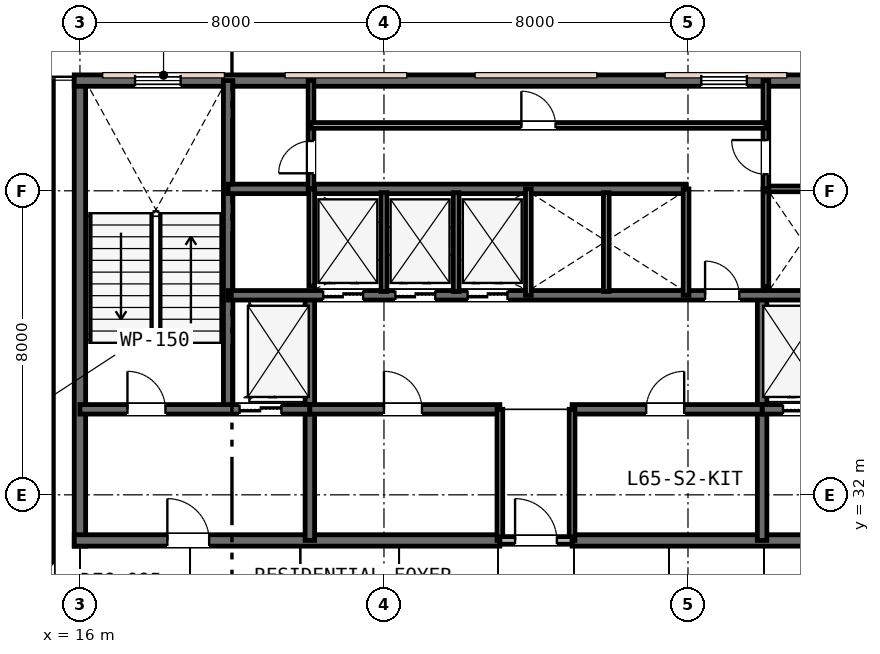
"""IFC4 building model, lengths in metres.
Left out: names, types, materials, properties, quantities, classifications, styles, units other than length and angle.
Written with IfcOpenShell. Run it as: python <this file> out.ifc"""

import sys

from ifc_helpers import new_model, si_unit, direction, frame, frame_2d, origin, place, context, subcontext, project, spatial, rectangle, extrude, element, fill, save


model = new_model("IFC4")
c1 = context("Model", 3, precision=1e-05, world=origin(), true_north=direction((0.0, 1.0)))
c2 = subcontext(c1, "Body", "Model", "MODEL_VIEW")
j1 = project(units=[si_unit("LENGTHUNIT", "METRE"), si_unit("PLANEANGLEUNIT", "RADIAN")], contexts=[c1])
p1 = place(None, origin())
s1 = spatial("IfcSite", under=j1, at=p1, CompositionType="ELEMENT")
p2 = place(p1, origin())
s2 = spatial("IfcBuilding", under=s1, at=p2, CompositionType="ELEMENT")
p3 = place(p2, frame((0.0, 0.0, 252.6)))
s3 = spatial("IfcBuildingStorey", under=s2, at=p3, CompositionType="ELEMENT", Elevation=252.6)
p4 = place(p3, frame((16.0, 30.65, 0.0), z_axis=(0.0, 0.0, 1.0), x_axis=(0.0, 1.0, 0.0)))
e1 = element("IfcWall", 1, at=p4, inside=s3, PredefinedType="SHEAR", context=c2, shape_type="SweptSolid", body=[
    extrude(rectangle(XDim=12.3, YDim=0.3, at=frame_2d((6.15, 0.0))), origin(), (0.0, 0.0, 1.0), 3.8),
])
p5 = place(p3, frame((15.85, 42.9, 0.0), z_axis=(0.0, 0.0, 1.0), x_axis=(1.0, 0.0, 0.0)))
e2 = element("IfcWall", 2, at=p5, inside=s3, PredefinedType="SHEAR", context=c2, shape_type="SweptSolid", body=[
    extrude(rectangle(XDim=24.3, YDim=0.3, at=frame_2d((12.15, 0.0))), origin(), (0.0, 0.0, 1.0), 3.8),
])
p6 = place(p5, frame((1.6, 0.0, 0.95)))
e3 = element("IfcOpeningElement", 3, at=p6, cuts=e2, PredefinedType="OPENING", context=c2, shape_type="SweptSolid", body=[
    extrude(rectangle(XDim=1.2, YDim=1.6, at=frame_2d((0.6, 0.8))), frame((0.0, 0.16, 0.0), z_axis=(0.0, -1.0, 0.0), x_axis=(1.0, 0.0, 0.0)), (0.0, 0.0, 1.0), 0.32),
])
p7 = place(p5, frame((16.5, 0.0, 0.95)))
e4 = element("IfcOpeningElement", 4, at=p7, cuts=e2, PredefinedType="OPENING", context=c2, shape_type="SweptSolid", body=[
    extrude(rectangle(XDim=1.2, YDim=1.6, at=frame_2d((0.6, 0.8))), frame((0.0, 0.16, 0.0), z_axis=(0.0, -1.0, 0.0), x_axis=(1.0, 0.0, 0.0)), (0.0, 0.0, 1.0), 0.32),
])
p8 = place(p5, frame((21.6, 0.0, 0.95)))
e5 = element("IfcOpeningElement", 5, at=p8, cuts=e2, PredefinedType="OPENING", context=c2, shape_type="SweptSolid", body=[
    extrude(rectangle(XDim=1.2, YDim=1.6, at=frame_2d((0.6, 0.8))), frame((0.0, 0.16, 0.0), z_axis=(0.0, -1.0, 0.0), x_axis=(1.0, 0.0, 0.0)), (0.0, 0.0, 1.0), 0.32),
])
p9 = place(p3, frame((15.85, 30.8, 0.0), z_axis=(0.0, 0.0, 1.0), x_axis=(1.0, 0.0, 0.0)))
e6 = element("IfcWall", 6, at=p9, inside=s3, PredefinedType="SHEAR", context=c2, shape_type="SweptSolid", body=[
    extrude(rectangle(XDim=11.2, YDim=0.3, at=frame_2d((5.6, 0.0))), origin(), (0.0, 0.0, 1.0), 3.8),
])
p10 = place(p9, frame((2.45, 0.0, 0.0)))
e7 = element("IfcOpeningElement", 7, at=p10, cuts=e6, PredefinedType="OPENING", context=c2, shape_type="SweptSolid", body=[
    extrude(rectangle(XDim=1.1, YDim=2.15, at=frame_2d((0.55, 1.075))), frame((0.0, 0.16, 0.0), z_axis=(0.0, -1.0, 0.0), x_axis=(1.0, 0.0, 0.0)), (0.0, 0.0, 1.0), 0.32),
])
p11 = place(p3, frame((28.95, 30.8, 0.0), z_axis=(0.0, 0.0, 1.0), x_axis=(1.0, 0.0, 0.0)))
e8 = element("IfcWall", 8, at=p11, inside=s3, PredefinedType="SHEAR", context=c2, shape_type="SweptSolid", body=[
    extrude(rectangle(XDim=11.2, YDim=0.3, at=frame_2d((5.6, 0.0))), origin(), (0.0, 0.0, 1.0), 3.8),
])
p12 = place(p11, frame((7.65, 0.0, 0.0)))
e9 = element("IfcOpeningElement", 9, at=p12, cuts=e8, PredefinedType="OPENING", context=c2, shape_type="SweptSolid", body=[
    extrude(rectangle(XDim=1.1, YDim=2.15, at=frame_2d((0.55, 1.075))), frame((0.0, 0.16, 0.0), z_axis=(0.0, -1.0, 0.0), x_axis=(1.0, 0.0, 0.0)), (0.0, 0.0, 1.0), 0.32),
])
p13 = place(p3, frame((19.9, 34.25, 0.0), z_axis=(0.0, 0.0, 1.0), x_axis=(0.0, 1.0, 0.0)))
e10 = element("IfcWall", 10, at=p13, inside=s3, PredefinedType="SHEAR", context=c2, shape_type="SweptSolid", body=[
    extrude(rectangle(XDim=8.65, YDim=0.25, at=frame_2d((4.325, 0.0))), origin(), (0.0, 0.0, 1.0), 3.8),
])
for number, where, z_axis, x_axis in (
    (11, (22.05, 30.8, 0.0), (0.0, 0.0, 1.0), (0.0, 1.0, 0.0)),
    (12, (33.95, 30.8, 0.0), (0.0, 0.0, 1.0), (0.0, 1.0, 0.0)),
):
    element("IfcWall", number, at=place(p3, frame(where, z_axis=z_axis, x_axis=x_axis)), inside=s3, PredefinedType="SHEAR", context=c2, shape_type="SweptSolid", body=[
        extrude(rectangle(XDim=6.45, YDim=0.25, at=frame_2d((3.225, 0.0))), origin(), (0.0, 0.0, 1.0), 3.8),
    ])
p14 = place(p3, frame((16.0, 34.25, 0.0), z_axis=(0.0, 0.0, 1.0), x_axis=(1.0, 0.0, 0.0)))
e13 = element("IfcWall", 13, at=p14, inside=s3, PredefinedType="SHEAR", context=c2, shape_type="SweptSolid", body=[
    extrude(rectangle(XDim=6.05, YDim=0.25, at=frame_2d((3.025, 0.0))), origin(), (0.0, 0.0, 1.0), 3.8),
])
p15 = place(p14, frame((1.25, 0.0, 0.0)))
e14 = element("IfcOpeningElement", 14, at=p15, cuts=e13, PredefinedType="OPENING", context=c2, shape_type="SweptSolid", body=[
    extrude(rectangle(XDim=1.0, YDim=2.15, at=frame_2d((0.5, 1.075))), frame((0.0, 0.135, 0.0), z_axis=(0.0, -1.0, 0.0), x_axis=(1.0, 0.0, 0.0)), (0.0, 0.0, 1.0), 0.27),
])
p16 = place(p14, frame((4.2, 0.0, 0.0)))
e15 = element("IfcOpeningElement", 15, at=p16, cuts=e13, PredefinedType="OPENING", context=c2, shape_type="SweptSolid", body=[
    extrude(rectangle(XDim=1.1, YDim=2.15, at=frame_2d((0.55, 1.075))), frame((0.0, 0.135, 0.0), z_axis=(0.0, -1.0, 0.0), x_axis=(1.0, 0.0, 0.0)), (0.0, 0.0, 1.0), 0.27),
])
p17 = place(p3, frame((33.95, 34.25, 0.0), z_axis=(0.0, 0.0, 1.0), x_axis=(1.0, 0.0, 0.0)))
e16 = element("IfcWall", 16, at=p17, inside=s3, PredefinedType="SHEAR", context=c2, shape_type="SweptSolid", body=[
    extrude(rectangle(XDim=6.05, YDim=0.25, at=frame_2d((3.025, 0.0))), origin(), (0.0, 0.0, 1.0), 3.8),
])
p18 = place(p17, frame((3.7, 0.0, 0.0)))
e17 = element("IfcOpeningElement", 17, at=p18, cuts=e16, PredefinedType="OPENING", context=c2, shape_type="SweptSolid", body=[
    extrude(rectangle(XDim=1.0, YDim=2.15, at=frame_2d((0.5, 1.075))), frame((0.0, 0.135, 0.0), z_axis=(0.0, -1.0, 0.0), x_axis=(1.0, 0.0, 0.0)), (0.0, 0.0, 1.0), 0.27),
])
p19 = place(p17, frame((0.55, 0.0, 0.0)))
e18 = element("IfcOpeningElement", 18, at=p19, cuts=e16, PredefinedType="OPENING", context=c2, shape_type="SweptSolid", body=[
    extrude(rectangle(XDim=1.1, YDim=2.15, at=frame_2d((0.55, 1.075))), frame((0.0, 0.135, 0.0), z_axis=(0.0, -1.0, 0.0), x_axis=(1.0, 0.0, 0.0)), (0.0, 0.0, 1.0), 0.27),
])
p20 = place(p3, frame((22.05, 34.25, 0.0), z_axis=(0.0, 0.0, 1.0), x_axis=(1.0, 0.0, 0.0)))
e19 = element("IfcWall", 19, at=p20, inside=s3, PredefinedType="SHEAR", context=c2, shape_type="SweptSolid", body=[
    extrude(rectangle(XDim=5.0, YDim=0.25, at=frame_2d((2.5, 0.0))), origin(), (0.0, 0.0, 1.0), 3.8),
])
p21 = place(p20, frame((1.95, 0.0, 0.0)))
e20 = element("IfcOpeningElement", 20, at=p21, cuts=e19, PredefinedType="OPENING", context=c2, shape_type="SweptSolid", body=[
    extrude(rectangle(XDim=1.0, YDim=2.15, at=frame_2d((0.5, 1.075))), frame((0.0, 0.135, 0.0), z_axis=(0.0, -1.0, 0.0), x_axis=(1.0, 0.0, 0.0)), (0.0, 0.0, 1.0), 0.27),
])
p22 = place(p3, frame((28.95, 34.25, 0.0), z_axis=(0.0, 0.0, 1.0), x_axis=(1.0, 0.0, 0.0)))
e21 = element("IfcWall", 21, at=p22, inside=s3, PredefinedType="SHEAR", context=c2, shape_type="SweptSolid", body=[
    extrude(rectangle(XDim=5.0, YDim=0.25, at=frame_2d((2.5, 0.0))), origin(), (0.0, 0.0, 1.0), 3.8),
])
p23 = place(p22, frame((1.95, 0.0, 0.0)))
e22 = element("IfcOpeningElement", 22, at=p23, cuts=e21, PredefinedType="OPENING", context=c2, shape_type="SweptSolid", body=[
    extrude(rectangle(XDim=1.0, YDim=2.15, at=frame_2d((0.5, 1.075))), frame((0.0, 0.135, 0.0), z_axis=(0.0, -1.0, 0.0), x_axis=(1.0, 0.0, 0.0)), (0.0, 0.0, 1.0), 0.27),
])
p24 = place(p3, frame((19.9, 37.25, 0.0), z_axis=(0.0, 0.0, 1.0), x_axis=(1.0, 0.0, 0.0)))
e23 = element("IfcWall", 23, at=p24, inside=s3, PredefinedType="SHEAR", context=c2, shape_type="SweptSolid", body=[
    extrude(rectangle(XDim=16.2, YDim=0.25, at=frame_2d((8.1, 0.0))), origin(), (0.0, 0.0, 1.0), 3.8),
])
p25 = place(p24, frame((12.55, 0.0, 0.0)))
e24 = element("IfcOpeningElement", 24, at=p25, cuts=e23, PredefinedType="OPENING", context=c2, shape_type="SweptSolid", body=[
    extrude(rectangle(XDim=0.9, YDim=2.15, at=frame_2d((0.45, 1.075))), frame((0.0, 0.135, 0.0), z_axis=(0.0, -1.0, 0.0), x_axis=(1.0, 0.0, 0.0)), (0.0, 0.0, 1.0), 0.27),
])
p26 = place(p24, frame((2.5, 0.0, 0.0)))
e25 = element("IfcOpeningElement", 25, at=p26, cuts=e23, PredefinedType="OPENING", context=c2, shape_type="SweptSolid", body=[
    extrude(rectangle(XDim=1.05, YDim=2.15, at=frame_2d((0.525, 1.075))), frame((0.0, 0.135, 0.0), z_axis=(0.0, -1.0, 0.0), x_axis=(1.0, 0.0, 0.0)), (0.0, 0.0, 1.0), 0.27),
])
p27 = place(p24, frame((4.4, 0.0, 0.0)))
e26 = element("IfcOpeningElement", 26, at=p27, cuts=e23, PredefinedType="OPENING", context=c2, shape_type="SweptSolid", body=[
    extrude(rectangle(XDim=1.05, YDim=2.15, at=frame_2d((0.525, 1.075))), frame((0.0, 0.135, 0.0), z_axis=(0.0, -1.0, 0.0), x_axis=(1.0, 0.0, 0.0)), (0.0, 0.0, 1.0), 0.27),
])
p28 = place(p24, frame((6.3, 0.0, 0.0)))
e27 = element("IfcOpeningElement", 27, at=p28, cuts=e23, PredefinedType="OPENING", context=c2, shape_type="SweptSolid", body=[
    extrude(rectangle(XDim=1.05, YDim=2.15, at=frame_2d((0.525, 1.075))), frame((0.0, 0.135, 0.0), z_axis=(0.0, -1.0, 0.0), x_axis=(1.0, 0.0, 0.0)), (0.0, 0.0, 1.0), 0.27),
])
p29 = place(p3, frame((19.9, 40.05, 0.0), z_axis=(0.0, 0.0, 1.0), x_axis=(1.0, 0.0, 0.0)))
e28 = element("IfcWall", 28, at=p29, inside=s3, PredefinedType="SHEAR", context=c2, shape_type="SweptSolid", body=[
    extrude(rectangle(XDim=12.05, YDim=0.25, at=frame_2d((6.025, 0.0))), origin(), (0.0, 0.0, 1.0), 3.8),
])
for number, where, z_axis, x_axis in (
    (29, (27.05, 30.8, 0.0), (0.0, 0.0, 1.0), (0.0, 1.0, 0.0)),
    (30, (28.95, 30.8, 0.0), (0.0, 0.0, 1.0), (0.0, 1.0, 0.0)),
):
    element("IfcWall", number, at=place(p3, frame(where, z_axis=z_axis, x_axis=x_axis)), inside=s3, PredefinedType="PLUMBINGWALL", context=c2, shape_type="SweptSolid", body=[
        extrude(rectangle(XDim=3.45, YDim=0.15, at=frame_2d((1.725, 0.0))), origin(), (0.0, 0.0, 1.0), 3.28),
    ])
p30 = place(p3, frame((27.05, 30.8, 0.0), z_axis=(0.0, 0.0, 1.0), x_axis=(1.0, 0.0, 0.0)))
e31 = element("IfcWall", 31, at=p30, inside=s3, PredefinedType="PARTITIONING", context=c2, shape_type="SweptSolid", body=[
    extrude(rectangle(XDim=1.9, YDim=0.2, at=frame_2d((0.95, 0.0))), origin(), (0.0, 0.0, 1.0), 3.28),
])
p31 = place(p30, frame((0.4, 0.0, 0.0)))
e32 = element("IfcOpeningElement", 32, at=p31, cuts=e31, PredefinedType="OPENING", context=c2, shape_type="SweptSolid", body=[
    extrude(rectangle(XDim=1.1, YDim=2.15, at=frame_2d((0.55, 1.075))), frame((0.0, 0.11, 0.0), z_axis=(0.0, -1.0, 0.0), x_axis=(1.0, 0.0, 0.0)), (0.0, 0.0, 1.0), 0.22),
])
p32 = place(p3, frame((22.1, 37.49, 0.0), z_axis=(0.0, 0.0, 1.0), x_axis=(0.0, 1.0, 0.0)))
e33 = element("IfcWall", 33, at=p32, inside=s3, PredefinedType="PLUMBINGWALL", context=c2, shape_type="SweptSolid", body=[
    extrude(rectangle(XDim=2.56, YDim=0.15, at=frame_2d((1.28, 0.0))), origin(), (0.0, 0.0, 1.0), 3.53),
])
p33 = place(p3, frame((27.8, 37.25, 0.0), z_axis=(0.0, 0.0, 1.0), x_axis=(0.0, 1.0, 0.0)))
e34 = element("IfcWall", 34, at=p33, inside=s3, PredefinedType="PLUMBINGWALL", context=c2, shape_type="SweptSolid", body=[
    extrude(rectangle(XDim=2.8, YDim=0.15, at=frame_2d((1.4, 0.0))), origin(), (0.0, 0.0, 1.0), 3.53),
])
for number, where, z_axis, x_axis in (
    (35, (24.0, 37.35, 0.0), (0.0, 0.0, 1.0), (0.0, 1.0, 0.0)),
    (36, (25.9, 37.35, 0.0), (0.0, 0.0, 1.0), (0.0, 1.0, 0.0)),
):
    element("IfcWall", number, at=place(p3, frame(where, z_axis=z_axis, x_axis=x_axis)), inside=s3, PredefinedType="PLUMBINGWALL", context=c2, shape_type="SweptSolid", body=[
        extrude(rectangle(XDim=2.6, YDim=0.15, at=frame_2d((1.3, 0.0))), origin(), (0.0, 0.0, 1.0), 3.53),
    ])
p34 = place(p3, frame((31.95, 37.25, 0.0), z_axis=(0.0, 0.0, 1.0), x_axis=(0.0, 1.0, 0.0)))
e37 = element("IfcWall", 37, at=p34, inside=s3, PredefinedType="PLUMBINGWALL", context=c2, shape_type="SweptSolid", body=[
    extrude(rectangle(XDim=2.8, YDim=0.15, at=frame_2d((1.4, 0.0))), origin(), (0.0, 0.0, 1.0), 3.53),
])
p35 = place(p3, frame((29.85, 37.35, 0.0), z_axis=(0.0, 0.0, 1.0), x_axis=(0.0, 1.0, 0.0)))
e38 = element("IfcWall", 38, at=p35, inside=s3, PredefinedType="PLUMBINGWALL", context=c2, shape_type="SweptSolid", body=[
    extrude(rectangle(XDim=2.6, YDim=0.15, at=frame_2d((1.3, 0.0))), origin(), (0.0, 0.0, 1.0), 3.53),
])
p36 = place(p3, frame((34.05, 37.473, 0.0), z_axis=(0.0, 0.0, 1.0), x_axis=(0.0, 1.0, 0.0)))
e39 = element("IfcWall", 39, at=p36, inside=s3, PredefinedType="PLUMBINGWALL", context=c2, shape_type="SweptSolid", body=[
    extrude(rectangle(XDim=2.577, YDim=0.15, at=frame_2d((1.288, 0.0))), origin(), (0.0, 0.0, 1.0), 3.53),
])
p37 = place(p3, frame((34.05, 40.05, 0.0), z_axis=(0.0, 0.0, 1.0), x_axis=(1.0, 0.0, 0.0)))
e40 = element("IfcWall", 40, at=p37, inside=s3, PredefinedType="PARTITIONING", context=c2, shape_type="SweptSolid", body=[
    extrude(rectangle(XDim=2.05, YDim=0.15, at=frame_2d((1.025, 0.0))), origin(), (0.0, 0.0, 1.0), 3.53),
])
p38 = place(p3, frame((34.05, 40.05, 0.0), z_axis=(0.0, 0.0, 1.0), x_axis=(0.0, 1.0, 0.0)))
e41 = element("IfcWall", 41, at=p38, inside=s3, PredefinedType="PARTITIONING", context=c2, shape_type="SweptSolid", body=[
    extrude(rectangle(XDim=2.85, YDim=0.15, at=frame_2d((1.425, 0.0))), origin(), (0.0, 0.0, 1.0), 3.53),
])
p39 = place(p38, frame((0.385, 0.0, 0.0)))
e42 = element("IfcOpeningElement", 42, at=p39, cuts=e41, PredefinedType="OPENING", context=c2, shape_type="SweptSolid", body=[
    extrude(rectangle(XDim=0.9, YDim=2.15, at=frame_2d((0.45, 1.075))), frame((0.0, 0.085, 0.0), z_axis=(0.0, -1.0, 0.0), x_axis=(1.0, 0.0, 0.0)), (0.0, 0.0, 1.0), 0.17),
])
p40 = place(p3, frame((22.08, 40.05, 0.0), z_axis=(0.0, 0.0, 1.0), x_axis=(0.0, 1.0, 0.0)))
e43 = element("IfcWall", 43, at=p40, inside=s3, PredefinedType="PARTITIONING", context=c2, shape_type="SweptSolid", body=[
    extrude(rectangle(XDim=2.85, YDim=0.15, at=frame_2d((1.425, 0.0))), origin(), (0.0, 0.0, 1.0), 3.53),
])
p41 = place(p40, frame((0.41, 0.0, 0.0)))
e44 = element("IfcOpeningElement", 44, at=p41, cuts=e43, PredefinedType="OPENING", context=c2, shape_type="SweptSolid", body=[
    extrude(rectangle(XDim=0.85, YDim=2.15, at=frame_2d((0.425, 1.075))), frame((0.0, 0.085, 0.0), z_axis=(0.0, -1.0, 0.0), x_axis=(1.0, 0.0, 0.0)), (0.0, 0.0, 1.0), 0.17),
])
p42 = place(p3, frame((22.08, 41.72, 0.0), z_axis=(0.0, 0.0, 1.0), x_axis=(1.0, 0.0, 0.0)))
e45 = element("IfcWall", 45, at=p42, inside=s3, PredefinedType="PARTITIONING", context=c2, shape_type="SweptSolid", body=[
    extrude(rectangle(XDim=11.97, YDim=0.15, at=frame_2d((5.985, 0.0))), origin(), (0.0, 0.0, 1.0), 3.53),
])
p43 = place(p42, frame((5.535, 0.0, 0.0)))
e46 = element("IfcOpeningElement", 46, at=p43, cuts=e45, PredefinedType="OPENING", context=c2, shape_type="SweptSolid", body=[
    extrude(rectangle(XDim=0.9, YDim=2.15, at=frame_2d((0.45, 1.075))), frame((0.0, 0.085, 0.0), z_axis=(0.0, -1.0, 0.0), x_axis=(1.0, 0.0, 0.0)), (0.0, 0.0, 1.0), 0.17),
])
p44 = place(p3, frame((15.2, 28.6, 0.0), z_axis=(0.0, 0.0, 1.0), x_axis=(0.0, 1.0, 0.0)))
e47 = element("IfcWall", 47, at=p44, inside=s3, PredefinedType="PARTITIONING", context=c2, shape_type="SweptSolid", body=[
    extrude(rectangle(XDim=14.3, YDim=0.2, at=frame_2d((7.15, 0.0))), origin(), (0.0, 0.0, 1.0), 3.16),
])
p45 = place(p44, frame((0.625, 0.0, 0.0)))
e48 = element("IfcOpeningElement", 48, at=p45, cuts=e47, PredefinedType="OPENING", context=c2, shape_type="SweptSolid", body=[
    extrude(rectangle(XDim=0.95, YDim=2.15, at=frame_2d((0.475, 1.075))), frame((0.0, 0.11, 0.0), z_axis=(0.0, -1.0, 0.0), x_axis=(1.0, 0.0, 0.0)), (0.0, 0.0, 1.0), 0.22),
])
p46 = place(p6, origin())
e49 = element("IfcWindow", 49, at=p46, inside=s3, PartitioningType="SINGLE_PANEL", PredefinedType="WINDOW", context=c2, shape_type="SweptSolid", body=[
    extrude(rectangle(XDim=1.2, YDim=1.6, at=frame_2d((0.6, 0.8))), frame((0.0, 0.03, 0.0), z_axis=(0.0, -1.0, 0.0), x_axis=(1.0, 0.0, 0.0)), (0.0, 0.0, 1.0), 0.06),
])
fill(e3, e49)
p47 = place(p7, origin())
e50 = element("IfcWindow", 50, at=p47, inside=s3, PartitioningType="SINGLE_PANEL", PredefinedType="WINDOW", context=c2, shape_type="SweptSolid", body=[
    extrude(rectangle(XDim=1.2, YDim=1.6, at=frame_2d((0.6, 0.8))), frame((0.0, 0.03, 0.0), z_axis=(0.0, -1.0, 0.0), x_axis=(1.0, 0.0, 0.0)), (0.0, 0.0, 1.0), 0.06),
])
fill(e4, e50)
p48 = place(p31, origin())
e51 = element("IfcDoor", 51, at=p48, inside=s3, OperationType="SINGLE_SWING_LEFT", PredefinedType="DOOR", context=c2, shape_type="SweptSolid", body=[
    extrude(rectangle(XDim=1.1, YDim=2.15, at=frame_2d((0.55, 1.075))), frame((0.0, 0.025, 0.0), z_axis=(0.0, -1.0, 0.0), x_axis=(1.0, 0.0, 0.0)), (0.0, 0.0, 1.0), 0.05),
])
fill(e32, e51)
p49 = place(p15, origin())
e52 = element("IfcDoor", 52, at=p49, inside=s3, OperationType="SINGLE_SWING_LEFT", PredefinedType="DOOR", context=c2, shape_type="SweptSolid", body=[
    extrude(rectangle(XDim=1.0, YDim=2.15, at=frame_2d((0.5, 1.075))), frame((0.0, 0.025, 0.0), z_axis=(0.0, -1.0, 0.0), x_axis=(1.0, 0.0, 0.0)), (0.0, 0.0, 1.0), 0.05),
])
fill(e14, e52)
p50 = place(p10, origin())
e53 = element("IfcDoor", 53, at=p50, inside=s3, OperationType="SINGLE_SWING_LEFT", PredefinedType="DOOR", context=c2, shape_type="SweptSolid", body=[
    extrude(rectangle(XDim=1.1, YDim=2.15, at=frame_2d((0.55, 1.075))), frame((0.0, 0.025, 0.0), z_axis=(0.0, -1.0, 0.0), x_axis=(1.0, 0.0, 0.0)), (0.0, 0.0, 1.0), 0.05),
])
fill(e7, e53)
p51 = place(p21, origin())
e54 = element("IfcDoor", 54, at=p51, inside=s3, OperationType="SINGLE_SWING_LEFT", PredefinedType="DOOR", context=c2, shape_type="SweptSolid", body=[
    extrude(rectangle(XDim=1.0, YDim=2.15, at=frame_2d((0.5, 1.075))), frame((0.0, 0.025, 0.0), z_axis=(0.0, -1.0, 0.0), x_axis=(1.0, 0.0, 0.0)), (0.0, 0.0, 1.0), 0.05),
])
fill(e20, e54)
p52 = place(p23, origin())
e55 = element("IfcDoor", 55, at=p52, inside=s3, OperationType="SINGLE_SWING_RIGHT", PredefinedType="DOOR", context=c2, shape_type="SweptSolid", body=[
    extrude(rectangle(XDim=1.0, YDim=2.15, at=frame_2d((0.5, 1.075))), frame((0.0, 0.025, 0.0), z_axis=(0.0, -1.0, 0.0), x_axis=(1.0, 0.0, 0.0)), (0.0, 0.0, 1.0), 0.05),
])
fill(e22, e55)
p53 = place(p25, origin())
e56 = element("IfcDoor", 56, at=p53, inside=s3, OperationType="SINGLE_SWING_LEFT", PredefinedType="DOOR", context=c2, shape_type="SweptSolid", body=[
    extrude(rectangle(XDim=0.9, YDim=2.15, at=frame_2d((0.45, 1.075))), frame((0.0, 0.025, 0.0), z_axis=(0.0, -1.0, 0.0), x_axis=(1.0, 0.0, 0.0)), (0.0, 0.0, 1.0), 0.05),
])
fill(e24, e56)
p54 = place(p39, origin())
e57 = element("IfcDoor", 57, at=p54, inside=s3, OperationType="SINGLE_SWING_RIGHT", PredefinedType="DOOR", context=c2, shape_type="SweptSolid", body=[
    extrude(rectangle(XDim=0.9, YDim=2.15, at=frame_2d((0.45, 1.075))), frame((0.0, 0.025, 0.0), z_axis=(0.0, -1.0, 0.0), x_axis=(1.0, 0.0, 0.0)), (0.0, 0.0, 1.0), 0.05),
])
fill(e42, e57)
p55 = place(p41, origin())
e58 = element("IfcDoor", 58, at=p55, inside=s3, OperationType="SINGLE_SWING_LEFT", PredefinedType="DOOR", context=c2, shape_type="SweptSolid", body=[
    extrude(rectangle(XDim=0.85, YDim=2.15, at=frame_2d((0.425, 1.075))), frame((0.0, 0.025, 0.0), z_axis=(0.0, -1.0, 0.0), x_axis=(1.0, 0.0, 0.0)), (0.0, 0.0, 1.0), 0.05),
])
fill(e44, e58)
p56 = place(p43, origin())
e59 = element("IfcDoor", 59, at=p56, inside=s3, OperationType="SINGLE_SWING_LEFT", PredefinedType="DOOR", context=c2, shape_type="SweptSolid", body=[
    extrude(rectangle(XDim=0.9, YDim=2.15, at=frame_2d((0.45, 1.075))), frame((0.0, 0.025, 0.0), z_axis=(0.0, -1.0, 0.0), x_axis=(1.0, 0.0, 0.0)), (0.0, 0.0, 1.0), 0.05),
])
fill(e46, e59)
p57 = place(p16, origin())
e60 = element("IfcDoor", 60, at=p57, inside=s3, OperationType="DOUBLE_DOOR_SLIDING", PredefinedType="DOOR", context=c2, shape_type="SweptSolid", body=[
    extrude(rectangle(XDim=1.1, YDim=2.15, at=frame_2d((0.55, 1.075))), frame((0.0, 0.025, 0.0), z_axis=(0.0, -1.0, 0.0), x_axis=(1.0, 0.0, 0.0)), (0.0, 0.0, 1.0), 0.05),
])
fill(e15, e60)
p58 = place(p19, origin())
e61 = element("IfcDoor", 61, at=p58, inside=s3, OperationType="DOUBLE_DOOR_SLIDING", PredefinedType="DOOR", context=c2, shape_type="SweptSolid", body=[
    extrude(rectangle(XDim=1.1, YDim=2.15, at=frame_2d((0.55, 1.075))), frame((0.0, 0.025, 0.0), z_axis=(0.0, -1.0, 0.0), x_axis=(1.0, 0.0, 0.0)), (0.0, 0.0, 1.0), 0.05),
])
fill(e18, e61)
p59 = place(p26, origin())
e62 = element("IfcDoor", 62, at=p59, inside=s3, OperationType="DOUBLE_DOOR_SLIDING", PredefinedType="DOOR", context=c2, shape_type="SweptSolid", body=[
    extrude(rectangle(XDim=1.05, YDim=2.15, at=frame_2d((0.525, 1.075))), frame((0.0, 0.025, 0.0), z_axis=(0.0, -1.0, 0.0), x_axis=(1.0, 0.0, 0.0)), (0.0, 0.0, 1.0), 0.05),
])
fill(e25, e62)
p60 = place(p27, origin())
e63 = element("IfcDoor", 63, at=p60, inside=s3, OperationType="DOUBLE_DOOR_SLIDING", PredefinedType="DOOR", context=c2, shape_type="SweptSolid", body=[
    extrude(rectangle(XDim=1.05, YDim=2.15, at=frame_2d((0.525, 1.075))), frame((0.0, 0.025, 0.0), z_axis=(0.0, -1.0, 0.0), x_axis=(1.0, 0.0, 0.0)), (0.0, 0.0, 1.0), 0.05),
])
fill(e26, e63)
p61 = place(p28, origin())
e64 = element("IfcDoor", 64, at=p61, inside=s3, OperationType="DOUBLE_DOOR_SLIDING", PredefinedType="DOOR", context=c2, shape_type="SweptSolid", body=[
    extrude(rectangle(XDim=1.05, YDim=2.15, at=frame_2d((0.525, 1.075))), frame((0.0, 0.025, 0.0), z_axis=(0.0, -1.0, 0.0), x_axis=(1.0, 0.0, 0.0)), (0.0, 0.0, 1.0), 0.05),
])
fill(e27, e64)
save(model, sys.argv[1])
